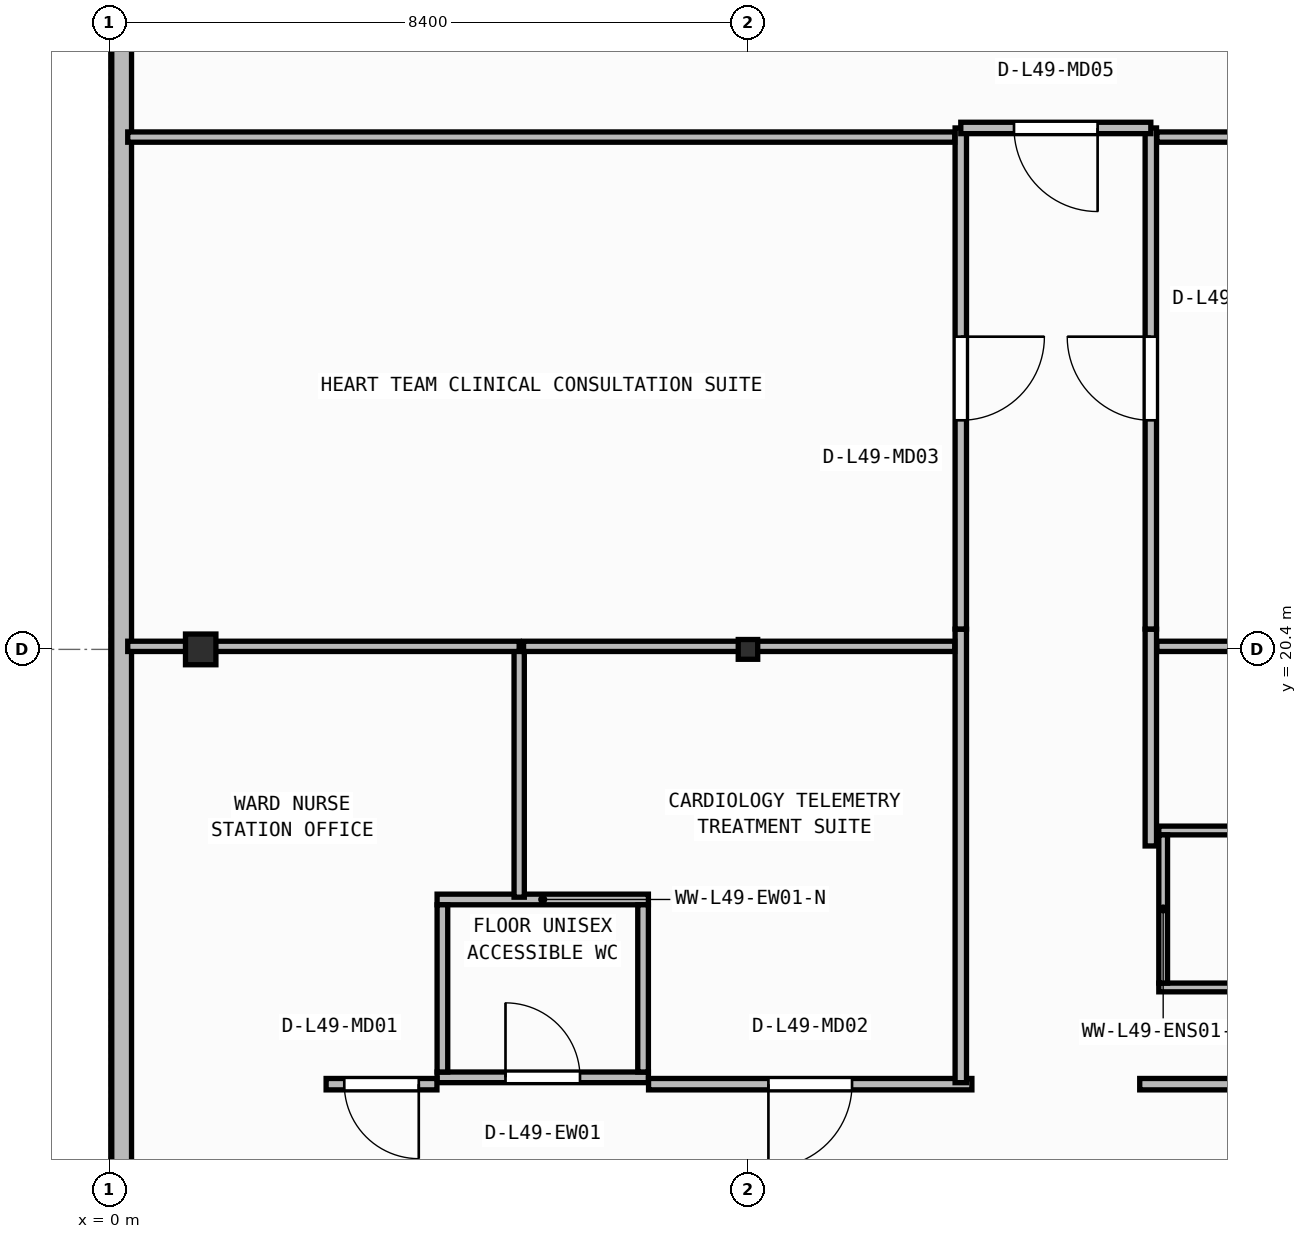
"""IFC4 building model, lengths in metres.
Left out: names, types, materials, properties, quantities, classifications, styles, units other than length and angle.
Written with IfcOpenShell. Run it as: python <this file> out.ifc"""

import sys

from ifc_helpers import new_model, si_unit, direction, frame, frame_2d, origin, origin_2d, place, context, subcontext, project, spatial, rectangle, i_section, extrude, element, fill, save


model = new_model("IFC4")
c1 = context("Model", 3, precision=1e-05, world=origin(), true_north=direction((0.0, 1.0)))
c2 = subcontext(c1, "Body", "Model", "MODEL_VIEW")
j1 = project(units=[si_unit("LENGTHUNIT", "METRE"), si_unit("PLANEANGLEUNIT", "RADIAN")], contexts=[c1])
p1 = place(None, origin())
s1 = spatial("IfcSite", under=j1, at=p1, CompositionType="ELEMENT")
p2 = place(p1, origin())
s2 = spatial("IfcBuilding", under=s1, at=p2, CompositionType="ELEMENT")
p3 = place(p2, frame((0.0, 0.0, 200.0)))
s3 = spatial("IfcBuildingStorey", under=s2, at=p3, CompositionType="ELEMENT", Elevation=200.0)
p4 = place(p3, frame((1.2, 20.4, 0.0), z_axis=(0.0, 0.0, 1.0), x_axis=(1.0, 0.0, 0.0)))
e1 = element("IfcColumn", 1, at=p4, inside=s3, PredefinedType="COLUMN", context=c2, shape_type="SweptSolid", body=[
    extrude(i_section(OverallWidth=0.4, OverallDepth=0.404, WebThickness=0.02, FlangeThickness=0.032, at=origin_2d()), origin(), (0.0, 0.0, 1.0), 3.95),
])
p5 = place(p3, frame((8.4, 20.4, 0.0), z_axis=(0.0, 0.0, 1.0), x_axis=(1.0, 0.0, 0.0)))
e2 = element("IfcColumn", 2, at=p5, inside=s3, PredefinedType="COLUMN", context=c2, shape_type="SweptSolid", body=[
    extrude(i_section(OverallWidth=0.256, OverallDepth=0.26, WebThickness=0.01, FlangeThickness=0.017, FilletRadius=0.013, at=origin_2d()), origin(), (0.0, 0.0, 1.0), 3.95),
])
p6 = place(p3, frame((0.16, 40.14, 0.0), z_axis=(0.0, 0.0, 1.0), x_axis=(0.0, -1.0, 0.0)))
e3 = element("IfcWall", 3, at=p6, inside=s3, PredefinedType="STANDARD", context=c2, shape_type="SweptSolid", body=[
    extrude(rectangle(XDim=37.48, YDim=0.26, at=frame_2d((18.74, 0.0))), origin(), (0.0, 0.0, 1.0), 3.71),
])
p7 = place(p6, frame((27.4, 0.0, 0.9)))
e4 = element("IfcOpeningElement", 4, at=p7, cuts=e3, PredefinedType="OPENING", context=c2, shape_type="SweptSolid", body=[
    extrude(rectangle(XDim=2.4, YDim=1.65, at=frame_2d((1.2, 0.825))), frame((0.0, 0.14, 0.0), z_axis=(0.0, -1.0, 0.0), x_axis=(1.0, 0.0, 0.0)), (0.0, 0.0, 1.0), 0.28),
])
p8 = place(p3, frame((4.31, 14.77, 0.0), z_axis=(0.0, 0.0, 1.0), x_axis=(1.0, 0.0, 0.0)))
e5 = element("IfcWall", 5, at=p8, inside=s3, PredefinedType="PARTITIONING", context=c2, shape_type="SweptSolid", body=[
    extrude(rectangle(XDim=2.78, YDim=0.14, at=frame_2d((1.39, 0.0))), origin(), (0.0, 0.0, 1.0), 3.71),
])
p9 = place(p8, frame((0.9, 0.0, 0.0)))
e6 = element("IfcOpeningElement", 6, at=p9, cuts=e5, PredefinedType="OPENING", context=c2, shape_type="SweptSolid", body=[
    extrude(rectangle(XDim=0.98, YDim=2.1, at=frame_2d((0.49, 1.05))), frame((0.0, 0.08, 0.0), z_axis=(0.0, -1.0, 0.0), x_axis=(1.0, 0.0, 0.0)), (0.0, 0.0, 1.0), 0.16),
])
p10 = place(p3, frame((4.31, 17.11, 0.0), z_axis=(0.0, 0.0, 1.0), x_axis=(1.0, 0.0, 0.0)))
e7 = element("IfcWall", 7, at=p10, inside=s3, PredefinedType="PARTITIONING", context=c2, shape_type="SweptSolid", body=[
    extrude(rectangle(XDim=2.78, YDim=0.14, at=frame_2d((1.39, 0.0))), origin(), (0.0, 0.0, 1.0), 3.71),
])
for number, where, z_axis, x_axis in (
    (8, (4.38, 14.84, 0.0), (0.0, 0.0, 1.0), (0.0, 1.0, 0.0)),
    (9, (7.02, 14.84, 0.0), (0.0, 0.0, 1.0), (0.0, 1.0, 0.0)),
):
    element("IfcWall", number, at=place(p3, frame(where, z_axis=z_axis, x_axis=x_axis)), inside=s3, PredefinedType="PARTITIONING", context=c2, shape_type="SweptSolid", body=[
        extrude(rectangle(XDim=2.2, YDim=0.14, at=frame_2d((1.1, 0.0))), origin(), (0.0, 0.0, 1.0), 3.71),
    ])
for number, where, z_axis, x_axis in (
    (10, (13.805, 15.952, 0.0), (0.0, 0.0, 1.0), (1.0, 0.0, 0.0)),
    (11, (13.805, 18.018, 0.0), (0.0, 0.0, 1.0), (1.0, 0.0, 0.0)),
):
    element("IfcWall", number, at=place(p3, frame(where, z_axis=z_axis, x_axis=x_axis)), inside=s3, PredefinedType="PARTITIONING", context=c2, shape_type="SweptSolid", body=[
        extrude(rectangle(XDim=2.15, YDim=0.115, at=frame_2d((1.075, 0.0))), origin(), (0.0, 0.0, 1.0), 3.71),
    ])
p11 = place(p3, frame((13.863, 16.01, 0.0), z_axis=(0.0, 0.0, 1.0), x_axis=(0.0, 1.0, 0.0)))
e12 = element("IfcWall", 12, at=p11, inside=s3, PredefinedType="PARTITIONING", context=c2, shape_type="SweptSolid", body=[
    extrude(rectangle(XDim=1.95, YDim=0.115, at=frame_2d((0.975, 0.0))), origin(), (0.0, 0.0, 1.0), 3.71),
])
p12 = place(p3, frame((4.308, 14.68, 0.0), z_axis=(0.0, 0.0, 1.0), x_axis=(-1.0, 0.0, 0.0)))
e13 = element("IfcWall", 13, at=p12, inside=s3, PredefinedType="PARTITIONING", context=c2, shape_type="SweptSolid", body=[
    extrude(rectangle(XDim=1.458, YDim=0.15, at=frame_2d((0.729, 0.0))), origin(), (0.0, 0.0, 1.0), 3.71),
])
p13 = place(p12, frame((0.239, 0.0, 0.0)))
e14 = element("IfcOpeningElement", 14, at=p13, cuts=e13, PredefinedType="OPENING", context=c2, shape_type="SweptSolid", body=[
    extrude(rectangle(XDim=0.98, YDim=2.1, at=frame_2d((0.49, 1.05))), frame((0.0, 0.085, 0.0), z_axis=(0.0, -1.0, 0.0), x_axis=(1.0, 0.0, 0.0)), (0.0, 0.0, 1.0), 0.17),
])
p14 = place(p3, frame((11.346, 14.68, 0.0), z_axis=(0.0, 0.0, 1.0), x_axis=(-1.0, 0.0, 0.0)))
e15 = element("IfcWall", 15, at=p14, inside=s3, PredefinedType="PARTITIONING", context=c2, shape_type="SweptSolid", body=[
    extrude(rectangle(XDim=4.254, YDim=0.15, at=frame_2d((2.127, 0.0))), origin(), (0.0, 0.0, 1.0), 3.71),
])
p15 = place(p14, frame((1.577, 0.0, 0.0)))
e16 = element("IfcOpeningElement", 16, at=p15, cuts=e15, PredefinedType="OPENING", context=c2, shape_type="SweptSolid", body=[
    extrude(rectangle(XDim=1.1, YDim=2.1, at=frame_2d((0.55, 1.05))), frame((0.0, 0.085, 0.0), z_axis=(0.0, -1.0, 0.0), x_axis=(1.0, 0.0, 0.0)), (0.0, 0.0, 1.0), 0.17),
])
p16 = place(p3, frame((18.966, 14.68, 0.0), z_axis=(0.0, 0.0, 1.0), x_axis=(-1.0, 0.0, 0.0)))
e17 = element("IfcWall", 17, at=p16, inside=s3, PredefinedType="PARTITIONING", context=c2, shape_type="SweptSolid", body=[
    extrude(rectangle(XDim=5.412, YDim=0.15, at=frame_2d((2.706, 0.0))), origin(), (0.0, 0.0, 1.0), 3.71),
])
p17 = place(p16, frame((2.056, 0.0, 0.0)))
e18 = element("IfcOpeningElement", 18, at=p17, cuts=e17, PredefinedType="OPENING", context=c2, shape_type="SweptSolid", body=[
    extrude(rectangle(XDim=1.3, YDim=2.15, at=frame_2d((0.65, 1.075))), frame((0.0, 0.085, 0.0), z_axis=(0.0, -1.0, 0.0), x_axis=(1.0, 0.0, 0.0)), (0.0, 0.0, 1.0), 0.17),
])
p18 = place(p3, frame((11.2, 20.666, 0.0), z_axis=(0.0, 0.0, 1.0), x_axis=(0.0, -1.0, 0.0)))
e19 = element("IfcWall", 19, at=p18, inside=s3, PredefinedType="PARTITIONING", context=c2, shape_type="SweptSolid", body=[
    extrude(rectangle(XDim=5.966, YDim=0.15, at=frame_2d((2.983, 0.0))), origin(), (0.0, 0.0, 1.0), 3.71),
])
p19 = place(p3, frame((13.7, 17.814, 0.0), z_axis=(0.0, 0.0, 1.0), x_axis=(0.0, 1.0, 0.0)))
e20 = element("IfcWall", 20, at=p19, inside=s3, PredefinedType="PARTITIONING", context=c2, shape_type="SweptSolid", body=[
    extrude(rectangle(XDim=2.852, YDim=0.15, at=frame_2d((1.426, 0.0))), origin(), (0.0, 0.0, 1.0), 3.71),
])
p20 = place(p3, frame((11.2, 27.26, 0.0), z_axis=(0.0, 0.0, 1.0), x_axis=(0.0, -1.0, 0.0)))
e21 = element("IfcWall", 21, at=p20, inside=s3, PredefinedType="PARTITIONING", context=c2, shape_type="SweptSolid", body=[
    extrude(rectangle(XDim=6.592, YDim=0.15, at=frame_2d((3.296, 0.0))), origin(), (0.0, 0.0, 1.0), 3.71),
])
p21 = place(p20, frame((2.746, 0.0, 0.0)))
e22 = element("IfcOpeningElement", 22, at=p21, cuts=e21, PredefinedType="OPENING", context=c2, shape_type="SweptSolid", body=[
    extrude(rectangle(XDim=1.1, YDim=2.1, at=frame_2d((0.55, 1.05))), frame((0.0, 0.085, 0.0), z_axis=(0.0, -1.0, 0.0), x_axis=(1.0, 0.0, 0.0)), (0.0, 0.0, 1.0), 0.17),
])
p22 = place(p3, frame((13.7, 20.668, 0.0), z_axis=(0.0, 0.0, 1.0), x_axis=(0.0, 1.0, 0.0)))
e23 = element("IfcWall", 23, at=p22, inside=s3, PredefinedType="PARTITIONING", context=c2, shape_type="SweptSolid", body=[
    extrude(rectangle(XDim=6.592, YDim=0.15, at=frame_2d((3.296, 0.0))), origin(), (0.0, 0.0, 1.0), 3.71),
])
p23 = place(p22, frame((2.746, 0.0, 0.0)))
e24 = element("IfcOpeningElement", 24, at=p23, cuts=e23, PredefinedType="OPENING", context=c2, shape_type="SweptSolid", body=[
    extrude(rectangle(XDim=1.1, YDim=2.1, at=frame_2d((0.55, 1.05))), frame((0.0, 0.085, 0.0), z_axis=(0.0, -1.0, 0.0), x_axis=(1.0, 0.0, 0.0)), (0.0, 0.0, 1.0), 0.17),
])
p24 = place(p3, frame((13.7, 27.26, 0.0), z_axis=(0.0, 0.0, 1.0), x_axis=(-1.0, 0.0, 0.0)))
e25 = element("IfcWall", 25, at=p24, inside=s3, PredefinedType="PARTITIONING", context=c2, shape_type="SweptSolid", body=[
    extrude(rectangle(XDim=2.5, YDim=0.15, at=frame_2d((1.25, 0.0))), origin(), (0.0, 0.0, 1.0), 3.71),
])
p25 = place(p24, frame((0.7, 0.0, 0.0)))
e26 = element("IfcOpeningElement", 26, at=p25, cuts=e25, PredefinedType="OPENING", context=c2, shape_type="SweptSolid", body=[
    extrude(rectangle(XDim=1.1, YDim=2.1, at=frame_2d((0.55, 1.05))), frame((0.0, 0.085, 0.0), z_axis=(0.0, -1.0, 0.0), x_axis=(1.0, 0.0, 0.0)), (0.0, 0.0, 1.0), 0.17),
])
p26 = place(p3, frame((5.39, 17.14, 0.0), z_axis=(0.0, 0.0, 1.0), x_axis=(0.0, 1.0, 0.0)))
e27 = element("IfcWall", 27, at=p26, inside=s3, PredefinedType="PARTITIONING", context=c2, shape_type="SweptSolid", body=[
    extrude(rectangle(XDim=3.3, YDim=0.135, at=frame_2d((1.65, 0.0))), origin(), (0.0, 0.0, 1.0), 3.71),
])
p27 = place(p3, frame((5.39, 20.44, 0.0), z_axis=(0.0, 0.0, 1.0), x_axis=(-1.0, 0.0, 0.0)))
e28 = element("IfcWall", 28, at=p27, inside=s3, PredefinedType="PARTITIONING", context=c2, shape_type="SweptSolid", body=[
    extrude(rectangle(XDim=5.15, YDim=0.135, at=frame_2d((2.575, 0.0))), origin(), (0.0, 0.0, 1.0), 3.152),
])
p28 = place(p3, frame((11.12, 20.44, 0.0), z_axis=(0.0, 0.0, 1.0), x_axis=(-1.0, 0.0, 0.0)))
e29 = element("IfcWall", 29, at=p28, inside=s3, PredefinedType="PARTITIONING", context=c2, shape_type="SweptSolid", body=[
    extrude(rectangle(XDim=5.673, YDim=0.135, at=frame_2d((2.836, 0.0))), origin(), (0.0, 0.0, 1.0), 3.152),
])
p29 = place(p3, frame((18.74, 20.44, 0.0), z_axis=(0.0, 0.0, 1.0), x_axis=(-1.0, 0.0, 0.0)))
e30 = element("IfcWall", 30, at=p29, inside=s3, PredefinedType="PARTITIONING", context=c2, shape_type="SweptSolid", body=[
    extrude(rectangle(XDim=4.96, YDim=0.135, at=frame_2d((2.48, 0.0))), origin(), (0.0, 0.0, 1.0), 3.152),
])
p30 = place(p3, frame((11.12, 27.14, 0.0), z_axis=(0.0, 0.0, 1.0), x_axis=(-1.0, 0.0, 0.0)))
e31 = element("IfcWall", 31, at=p30, inside=s3, PredefinedType="PARTITIONING", context=c2, shape_type="SweptSolid", body=[
    extrude(rectangle(XDim=10.88, YDim=0.135, at=frame_2d((5.44, 0.0))), origin(), (0.0, 0.0, 1.0), 3.71),
])
p31 = place(p3, frame((16.518, 27.14, 0.0), z_axis=(0.0, 0.0, 1.0), x_axis=(-1.0, 0.0, 0.0)))
e32 = element("IfcWall", 32, at=p31, inside=s3, PredefinedType="PARTITIONING", context=c2, shape_type="SweptSolid", body=[
    extrude(rectangle(XDim=2.738, YDim=0.135, at=frame_2d((1.369, 0.0))), origin(), (0.0, 0.0, 1.0), 3.71),
])
p32 = place(p9, origin())
e33 = element("IfcDoor", 33, at=p32, inside=s3, OperationType="SINGLE_SWING_LEFT", PredefinedType="DOOR", context=c2, shape_type="SweptSolid", body=[
    extrude(rectangle(XDim=0.98, YDim=2.1, at=frame_2d((0.49, 1.05))), frame((0.0, 0.025, 0.0), z_axis=(0.0, -1.0, 0.0), x_axis=(1.0, 0.0, 0.0)), (0.0, 0.0, 1.0), 0.05),
])
fill(e6, e33)
p33 = place(p13, origin())
e34 = element("IfcDoor", 34, at=p33, inside=s3, OperationType="SINGLE_SWING_LEFT", PredefinedType="DOOR", context=c2, shape_type="SweptSolid", body=[
    extrude(rectangle(XDim=0.98, YDim=2.1, at=frame_2d((0.49, 1.05))), frame((0.0, 0.025, 0.0), z_axis=(0.0, -1.0, 0.0), x_axis=(1.0, 0.0, 0.0)), (0.0, 0.0, 1.0), 0.05),
])
fill(e14, e34)
p34 = place(p15, origin())
e35 = element("IfcDoor", 35, at=p34, inside=s3, OperationType="SINGLE_SWING_RIGHT", PredefinedType="DOOR", context=c2, shape_type="SweptSolid", body=[
    extrude(rectangle(XDim=1.1, YDim=2.1, at=frame_2d((0.55, 1.05))), frame((0.0, 0.025, 0.0), z_axis=(0.0, -1.0, 0.0), x_axis=(1.0, 0.0, 0.0)), (0.0, 0.0, 1.0), 0.05),
])
fill(e16, e35)
p35 = place(p21, origin())
e36 = element("IfcDoor", 36, at=p35, inside=s3, OperationType="SINGLE_SWING_LEFT", PredefinedType="DOOR", context=c2, shape_type="SweptSolid", body=[
    extrude(rectangle(XDim=1.1, YDim=2.1, at=frame_2d((0.55, 1.05))), frame((0.0, 0.025, 0.0), z_axis=(0.0, -1.0, 0.0), x_axis=(1.0, 0.0, 0.0)), (0.0, 0.0, 1.0), 0.05),
])
fill(e22, e36)
p36 = place(p23, origin())
e37 = element("IfcDoor", 37, at=p36, inside=s3, OperationType="SINGLE_SWING_RIGHT", PredefinedType="DOOR", context=c2, shape_type="SweptSolid", body=[
    extrude(rectangle(XDim=1.1, YDim=2.1, at=frame_2d((0.55, 1.05))), frame((0.0, 0.025, 0.0), z_axis=(0.0, -1.0, 0.0), x_axis=(1.0, 0.0, 0.0)), (0.0, 0.0, 1.0), 0.05),
])
fill(e24, e37)
p37 = place(p25, origin())
e38 = element("IfcDoor", 38, at=p37, inside=s3, OperationType="SINGLE_SWING_LEFT", PredefinedType="DOOR", context=c2, shape_type="SweptSolid", body=[
    extrude(rectangle(XDim=1.1, YDim=2.1, at=frame_2d((0.55, 1.05))), frame((0.0, 0.025, 0.0), z_axis=(0.0, -1.0, 0.0), x_axis=(1.0, 0.0, 0.0)), (0.0, 0.0, 1.0), 0.05),
])
fill(e26, e38)
save(model, sys.argv[1])
